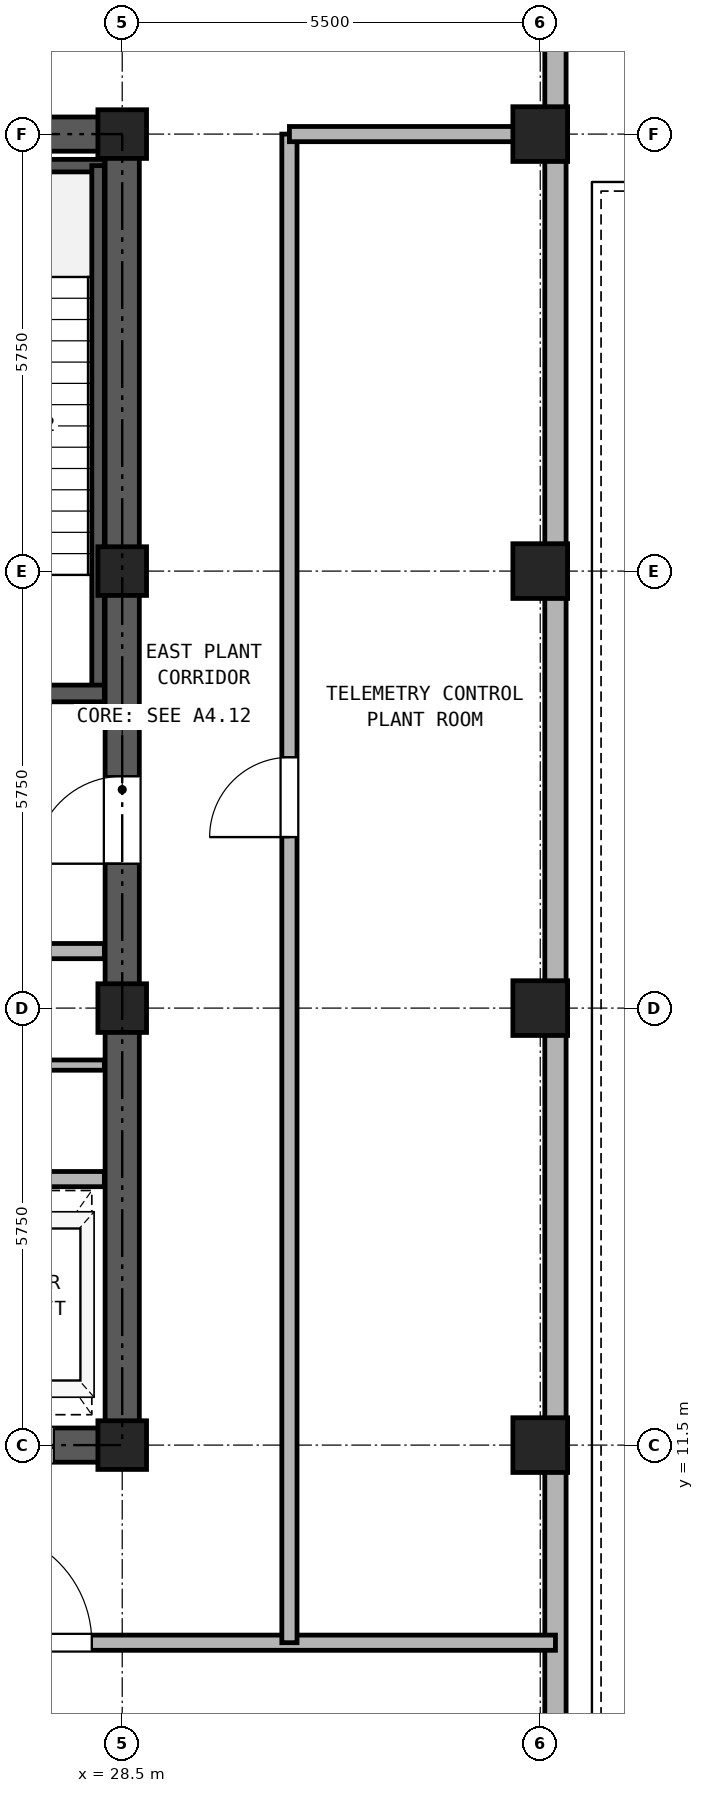
"""IFC4 building model, lengths in metres.
Left out: names, types, materials, properties, quantities, classifications, styles, units other than length and angle.
Written with IfcOpenShell. Run it as: python <this file> out.ifc"""

import sys

from ifc_helpers import new_model, si_unit, direction, frame, frame_2d, origin, origin_2d, place, context, subcontext, project, spatial, rectangle, hollow_rectangle, extrude, source, transform, mapped, element, fill, save


model = new_model("IFC4")
c1 = context("Model", 3, precision=1e-05, world=origin(), true_north=direction((0.0, 1.0)))
c2 = subcontext(c1, "Body", "Model", "MODEL_VIEW")
j1 = project(units=[si_unit("LENGTHUNIT", "METRE"), si_unit("PLANEANGLEUNIT", "RADIAN")], contexts=[c1])
p1 = place(None, origin())
s1 = spatial("IfcSite", under=j1, at=p1, CompositionType="ELEMENT")
p2 = place(p1, origin())
s2 = spatial("IfcBuilding", under=s1, at=p2, CompositionType="ELEMENT")
p3 = place(p2, frame((0.0, 0.0, 188.1)))
s3 = spatial("IfcBuildingStorey", under=s2, at=p3, CompositionType="ELEMENT", Elevation=188.1)
m1 = source(origin(), c2, "Body", "SweptSolid", [
    extrude(hollow_rectangle(XDim=0.64, YDim=0.64, WallThickness=0.035, at=origin_2d()), origin(), (0.0, 0.0, 1.0), 4.85),
])
for number, where, z_axis, x_axis in (
    (1, (28.5, 11.5, 0.0), (0.0, 0.0, 1.0), (1.0, 0.0, 0.0)),
    (2, (28.5, 17.25, 0.0), (0.0, 0.0, 1.0), (1.0, 0.0, 0.0)),
    (3, (28.5, 23.0, 0.0), (0.0, 0.0, 1.0), (1.0, 0.0, 0.0)),
    (4, (28.5, 28.75, 0.0), (0.0, 0.0, 1.0), (1.0, 0.0, 0.0)),
):
    element("IfcColumn", number, at=place(p3, frame(where, z_axis=z_axis, x_axis=x_axis)), inside=s3, PredefinedType="COLUMN", context=c2, shape_type="MappedRepresentation", body=[
        mapped(m1, transform((0.0, 0.0, 0.0), x_axis=(1.0, 0.0, 0.0), y_axis=(0.0, 1.0, 0.0), z_axis=(0.0, 0.0, 1.0), scale=1.0)),
    ])
m2 = source(origin(), c2, "Body", "SweptSolid", [
    extrude(hollow_rectangle(XDim=0.72, YDim=0.72, WallThickness=0.04, at=origin_2d()), origin(), (0.0, 0.0, 1.0), 4.85),
])
for number, where, z_axis, x_axis in (
    (5, (34.0, 11.5, 0.0), (0.0, 0.0, 1.0), (1.0, 0.0, 0.0)),
    (6, (34.0, 17.25, 0.0), (0.0, 0.0, 1.0), (1.0, 0.0, 0.0)),
    (7, (34.0, 23.0, 0.0), (0.0, 0.0, 1.0), (1.0, 0.0, 0.0)),
    (8, (34.0, 28.75, 0.0), (0.0, 0.0, 1.0), (1.0, 0.0, 0.0)),
):
    element("IfcColumn", number, at=place(p3, frame(where, z_axis=z_axis, x_axis=x_axis)), inside=s3, PredefinedType="COLUMN", context=c2, shape_type="MappedRepresentation", body=[
        mapped(m2, transform((0.0, 0.0, 0.0), x_axis=(1.0, 0.0, 0.0), y_axis=(0.0, 1.0, 0.0), z_axis=(0.0, 0.0, 1.0), scale=1.0)),
    ])
p4 = place(p3, frame((18.275, 11.5, 0.0), z_axis=(0.0, 0.0, 1.0), x_axis=(1.0, 0.0, 0.0)))
e9 = element("IfcWall", 9, at=p4, inside=s3, PredefinedType="SHEAR", context=c2, shape_type="SweptSolid", body=[
    extrude(rectangle(XDim=10.45, YDim=0.45, at=frame_2d((5.225, 0.0))), origin(), (0.0, 0.0, 1.0), 4.85),
])
p5 = place(p4, frame((1.825, 0.0, 0.0)))
e10 = element("IfcOpeningElement", 10, at=p5, cuts=e9, PredefinedType="OPENING", context=c2, shape_type="SweptSolid", body=[
    extrude(rectangle(XDim=0.95, YDim=2.15, at=frame_2d((0.475, 1.075))), frame((0.0, 0.235, 0.0), z_axis=(0.0, -1.0, 0.0), x_axis=(1.0, 0.0, 0.0)), (0.0, 0.0, 1.0), 0.47),
])
p6 = place(p4, frame((5.325, 0.0, 0.0)))
e11 = element("IfcOpeningElement", 11, at=p6, cuts=e9, PredefinedType="OPENING", context=c2, shape_type="SweptSolid", body=[
    extrude(rectangle(XDim=0.95, YDim=2.15, at=frame_2d((0.475, 1.075))), frame((0.0, 0.235, 0.0), z_axis=(0.0, -1.0, 0.0), x_axis=(1.0, 0.0, 0.0)), (0.0, 0.0, 1.0), 0.47),
])
p7 = place(p4, frame((8.225, 0.0, 0.0)))
e12 = element("IfcOpeningElement", 12, at=p7, cuts=e9, PredefinedType="OPENING", context=c2, shape_type="SweptSolid", body=[
    extrude(rectangle(XDim=1.1, YDim=2.25, at=frame_2d((0.55, 1.125))), frame((0.0, 0.235, 0.0), z_axis=(0.0, -1.0, 0.0), x_axis=(1.0, 0.0, 0.0)), (0.0, 0.0, 1.0), 0.47),
])
p8 = place(p3, frame((18.275, 28.75, 0.0), z_axis=(0.0, 0.0, 1.0), x_axis=(1.0, 0.0, 0.0)))
e13 = element("IfcWall", 13, at=p8, inside=s3, PredefinedType="SHEAR", context=c2, shape_type="SweptSolid", body=[
    extrude(rectangle(XDim=10.45, YDim=0.45, at=frame_2d((5.225, 0.0))), origin(), (0.0, 0.0, 1.0), 4.85),
])
p9 = place(p8, frame((4.105, 0.0, 0.0)))
e14 = element("IfcOpeningElement", 14, at=p9, cuts=e13, PredefinedType="OPENING", context=c2, shape_type="SweptSolid", body=[
    extrude(rectangle(XDim=0.9, YDim=2.05, at=frame_2d((0.45, 1.025))), frame((0.0, 0.235, 0.0), z_axis=(0.0, -1.0, 0.0), x_axis=(1.0, 0.0, 0.0)), (0.0, 0.0, 1.0), 0.47),
])
p10 = place(p8, frame((5.645, 0.0, 0.0)))
e15 = element("IfcOpeningElement", 15, at=p10, cuts=e13, PredefinedType="OPENING", context=c2, shape_type="SweptSolid", body=[
    extrude(rectangle(XDim=0.9, YDim=2.05, at=frame_2d((0.45, 1.025))), frame((0.0, 0.235, 0.0), z_axis=(0.0, -1.0, 0.0), x_axis=(1.0, 0.0, 0.0)), (0.0, 0.0, 1.0), 0.47),
])
p11 = place(p3, frame((28.5, 11.725, 0.0), z_axis=(0.0, 0.0, 1.0), x_axis=(0.0, 1.0, 0.0)))
e16 = element("IfcWall", 16, at=p11, inside=s3, PredefinedType="SHEAR", context=c2, shape_type="SweptSolid", body=[
    extrude(rectangle(XDim=16.8, YDim=0.45, at=frame_2d((8.4, 0.0))), origin(), (0.0, 0.0, 1.0), 4.85),
])
p12 = place(p11, frame((7.425, 0.0, 0.0)))
e17 = element("IfcOpeningElement", 17, at=p12, cuts=e16, PredefinedType="OPENING", context=c2, shape_type="SweptSolid", body=[
    extrude(rectangle(XDim=1.15, YDim=2.2, at=frame_2d((0.575, 1.1))), frame((0.0, 0.235, 0.0), z_axis=(0.0, -1.0, 0.0), x_axis=(1.0, 0.0, 0.0)), (0.0, 0.0, 1.0), 0.47),
])
p13 = place(p3, frame((25.13, 28.335, 0.0), z_axis=(0.0, 0.0, 1.0), x_axis=(1.0, 0.0, 0.0)))
e18 = element("IfcWall", 18, at=p13, inside=s3, PredefinedType="PARTITIONING", context=c2, shape_type="SweptSolid", body=[
    extrude(rectangle(XDim=3.135, YDim=0.165, at=frame_2d((1.567, 0.0))), origin(), (0.0, 0.0, 1.0), 4.85),
])
p14 = place(p3, frame((28.183, 21.39, 0.0), z_axis=(0.0, 0.0, 1.0), x_axis=(0.0, 1.0, 0.0)))
e19 = element("IfcWall", 19, at=p14, inside=s3, PredefinedType="PARTITIONING", context=c2, shape_type="SweptSolid", body=[
    extrude(rectangle(XDim=6.945, YDim=0.165, at=frame_2d((3.473, 0.0))), origin(), (0.0, 0.0, 1.0), 4.85),
])
p15 = place(p3, frame((25.13, 21.39, 0.0), z_axis=(0.0, 0.0, 1.0), x_axis=(1.0, 0.0, 0.0)))
e20 = element("IfcWall", 20, at=p15, inside=s3, PredefinedType="SOLIDWALL", context=c2, shape_type="SweptSolid", body=[
    extrude(rectangle(XDim=3.135, YDim=0.22, at=frame_2d((1.567, 0.0))), origin(), (0.0, 0.0, 1.0), 4.85),
])
p16 = place(p15, frame((0.92, 0.0, 0.0)))
e21 = element("IfcOpeningElement", 21, at=p16, cuts=e20, PredefinedType="OPENING", context=c2, shape_type="SweptSolid", body=[
    extrude(rectangle(XDim=1.15, YDim=2.2, at=frame_2d((0.575, 1.1))), frame((0.0, 0.12, 0.0), z_axis=(0.0, -1.0, 0.0), x_axis=(1.0, 0.0, 0.0)), (0.0, 0.0, 1.0), 0.24),
])
p17 = place(p3, frame((18.735, 18.0, 0.0), z_axis=(0.0, 0.0, 1.0), x_axis=(1.0, 0.0, 0.0)))
e22 = element("IfcWall", 22, at=p17, inside=s3, PredefinedType="PARTITIONING", context=c2, shape_type="SweptSolid", body=[
    extrude(rectangle(XDim=9.53, YDim=0.2, at=frame_2d((4.765, 0.0))), origin(), (0.0, 0.0, 1.0), 4.85),
])
p18 = place(p17, frame((0.515, 0.0, 0.0)))
e23 = element("IfcOpeningElement", 23, at=p18, cuts=e22, PredefinedType="OPENING", context=c2, shape_type="SweptSolid", body=[
    extrude(rectangle(XDim=1.3, YDim=2.3, at=frame_2d((0.65, 1.15))), frame((0.0, 0.11, 0.0), z_axis=(0.0, -1.0, 0.0), x_axis=(1.0, 0.0, 0.0)), (0.0, 0.0, 1.0), 0.22),
])
p19 = place(p17, frame((2.615, 0.0, 0.0)))
e24 = element("IfcOpeningElement", 24, at=p19, cuts=e22, PredefinedType="OPENING", context=c2, shape_type="SweptSolid", body=[
    extrude(rectangle(XDim=1.3, YDim=2.3, at=frame_2d((0.65, 1.15))), frame((0.0, 0.11, 0.0), z_axis=(0.0, -1.0, 0.0), x_axis=(1.0, 0.0, 0.0)), (0.0, 0.0, 1.0), 0.22),
])
p20 = place(p17, frame((7.115, 0.0, 0.0)))
e25 = element("IfcOpeningElement", 25, at=p20, cuts=e22, PredefinedType="OPENING", context=c2, shape_type="SweptSolid", body=[
    extrude(rectangle(XDim=1.0, YDim=2.15, at=frame_2d((0.5, 1.075))), frame((0.0, 0.11, 0.0), z_axis=(0.0, -1.0, 0.0), x_axis=(1.0, 0.0, 0.0)), (0.0, 0.0, 1.0), 0.22),
])
p21 = place(p3, frame((18.735, 15.0, 0.0), z_axis=(0.0, 0.0, 1.0), x_axis=(1.0, 0.0, 0.0)))
e26 = element("IfcWall", 26, at=p21, inside=s3, PredefinedType="PARTITIONING", context=c2, shape_type="SweptSolid", body=[
    extrude(rectangle(XDim=9.53, YDim=0.2, at=frame_2d((4.765, 0.0))), origin(), (0.0, 0.0, 1.0), 4.85),
])
p22 = place(p3, frame((23.3, 16.5, 0.0), z_axis=(0.0, 0.0, 1.0), x_axis=(1.0, 0.0, 0.0)))
e27 = element("IfcWall", 27, at=p22, inside=s3, PredefinedType="PARTITIONING", context=c2, shape_type="SweptSolid", body=[
    extrude(rectangle(XDim=4.965, YDim=0.135, at=frame_2d((2.482, 0.0))), origin(), (0.0, 0.0, 1.0), 4.85),
])
p23 = place(p22, frame((2.55, 0.0, 0.0)))
e28 = element("IfcOpeningElement", 28, at=p23, cuts=e27, PredefinedType="OPENING", context=c2, shape_type="SweptSolid", body=[
    extrude(rectangle(XDim=0.9, YDim=2.05, at=frame_2d((0.45, 1.025))), frame((0.0, 0.077, 0.0), z_axis=(0.0, -1.0, 0.0), x_axis=(1.0, 0.0, 0.0)), (0.0, 0.0, 1.0), 0.155),
])
p24 = place(p3, frame((34.2, 0.25, 0.0), z_axis=(0.0, 0.0, 1.0), x_axis=(0.0, 1.0, 0.0)))
e29 = element("IfcWall", 29, at=p24, inside=s3, PredefinedType="SOLIDWALL", context=c2, shape_type="SweptSolid", body=[
    extrude(rectangle(XDim=34.8, YDim=0.28, at=frame_2d((17.4, 0.0))), origin(), (0.0, 0.0, 1.0), 4.223),
])
p25 = place(p3, frame((12.8, 8.9, 0.0), z_axis=(0.0, 0.0, 1.0), x_axis=(1.0, 0.0, 0.0)))
e30 = element("IfcWall", 30, at=p25, inside=s3, PredefinedType="PARTITIONING", context=c2, shape_type="SweptSolid", body=[
    extrude(rectangle(XDim=21.4, YDim=0.2, at=frame_2d((10.7, 0.0))), origin(), (0.0, 0.0, 1.0), 4.85),
])
p26 = place(p25, frame((6.6, 0.0, 0.0)))
e31 = element("IfcOpeningElement", 31, at=p26, cuts=e30, PredefinedType="OPENING", context=c2, shape_type="SweptSolid", body=[
    extrude(rectangle(XDim=1.5, YDim=2.25, at=frame_2d((0.75, 1.125))), frame((0.0, 0.11, 0.0), z_axis=(0.0, -1.0, 0.0), x_axis=(1.0, 0.0, 0.0)), (0.0, 0.0, 1.0), 0.22),
])
p27 = place(p25, frame((13.8, 0.0, 0.0)))
e32 = element("IfcOpeningElement", 32, at=p27, cuts=e30, PredefinedType="OPENING", context=c2, shape_type="SweptSolid", body=[
    extrude(rectangle(XDim=1.5, YDim=2.25, at=frame_2d((0.75, 1.125))), frame((0.0, 0.11, 0.0), z_axis=(0.0, -1.0, 0.0), x_axis=(1.0, 0.0, 0.0)), (0.0, 0.0, 1.0), 0.22),
])
p28 = place(p3, frame((30.7, 8.9, 0.0), z_axis=(0.0, 0.0, 1.0), x_axis=(0.0, 1.0, 0.0)))
e33 = element("IfcWall", 33, at=p28, inside=s3, PredefinedType="PARTITIONING", context=c2, shape_type="SweptSolid", body=[
    extrude(rectangle(XDim=19.85, YDim=0.2, at=frame_2d((9.925, 0.0))), origin(), (0.0, 0.0, 1.0), 4.85),
])
p29 = place(p28, frame((10.6, 0.0, 0.0)))
e34 = element("IfcOpeningElement", 34, at=p29, cuts=e33, PredefinedType="OPENING", context=c2, shape_type="SweptSolid", body=[
    extrude(rectangle(XDim=1.05, YDim=2.15, at=frame_2d((0.525, 1.075))), frame((0.0, 0.11, 0.0), z_axis=(0.0, -1.0, 0.0), x_axis=(1.0, 0.0, 0.0)), (0.0, 0.0, 1.0), 0.22),
])
p30 = place(p3, frame((30.7, 28.75, 0.0), z_axis=(0.0, 0.0, 1.0), x_axis=(1.0, 0.0, 0.0)))
e35 = element("IfcWall", 35, at=p30, inside=s3, PredefinedType="PARTITIONING", context=c2, shape_type="SweptSolid", body=[
    extrude(rectangle(XDim=3.5, YDim=0.2, at=frame_2d((1.75, 0.0))), origin(), (0.0, 0.0, 1.0), 4.223),
])
p31 = place(p12, origin())
e36 = element("IfcDoor", 36, at=p31, inside=s3, OperationType="SINGLE_SWING_LEFT", PredefinedType="DOOR", context=c2, shape_type="SweptSolid", body=[
    extrude(rectangle(XDim=1.15, YDim=2.2, at=frame_2d((0.575, 1.1))), frame((0.0, 0.025, 0.0), z_axis=(0.0, -1.0, 0.0), x_axis=(1.0, 0.0, 0.0)), (0.0, 0.0, 1.0), 0.05),
])
fill(e17, e36)
p32 = place(p7, frame((1.1, 0.0, 0.0), z_axis=(0.0, 0.0, 1.0), x_axis=(-1.0, 0.0, 0.0)))
e37 = element("IfcDoor", 37, at=p32, inside=s3, OperationType="DOUBLE_DOOR_SLIDING", PredefinedType="DOOR", context=c2, shape_type="SweptSolid", body=[
    extrude(rectangle(XDim=1.1, YDim=2.25, at=frame_2d((0.55, 1.125))), frame((0.0, 0.025, 0.0), z_axis=(0.0, -1.0, 0.0), x_axis=(1.0, 0.0, 0.0)), (0.0, 0.0, 1.0), 0.05),
])
fill(e12, e37)
p33 = place(p27, frame((1.5, 0.0, 0.0), z_axis=(0.0, 0.0, 1.0), x_axis=(-1.0, 0.0, 0.0)))
e38 = element("IfcDoor", 38, at=p33, inside=s3, OperationType="SINGLE_SWING_LEFT", PredefinedType="DOOR", context=c2, shape_type="SweptSolid", body=[
    extrude(rectangle(XDim=1.5, YDim=2.25, at=frame_2d((0.75, 1.125))), frame((0.0, 0.025, 0.0), z_axis=(0.0, -1.0, 0.0), x_axis=(1.0, 0.0, 0.0)), (0.0, 0.0, 1.0), 0.05),
])
fill(e32, e38)
p34 = place(p29, origin())
e39 = element("IfcDoor", 39, at=p34, inside=s3, OperationType="SINGLE_SWING_LEFT", PredefinedType="DOOR", context=c2, shape_type="SweptSolid", body=[
    extrude(rectangle(XDim=1.05, YDim=2.15, at=frame_2d((0.525, 1.075))), frame((0.0, 0.025, 0.0), z_axis=(0.0, -1.0, 0.0), x_axis=(1.0, 0.0, 0.0)), (0.0, 0.0, 1.0), 0.05),
])
fill(e34, e39)
save(model, sys.argv[1])
